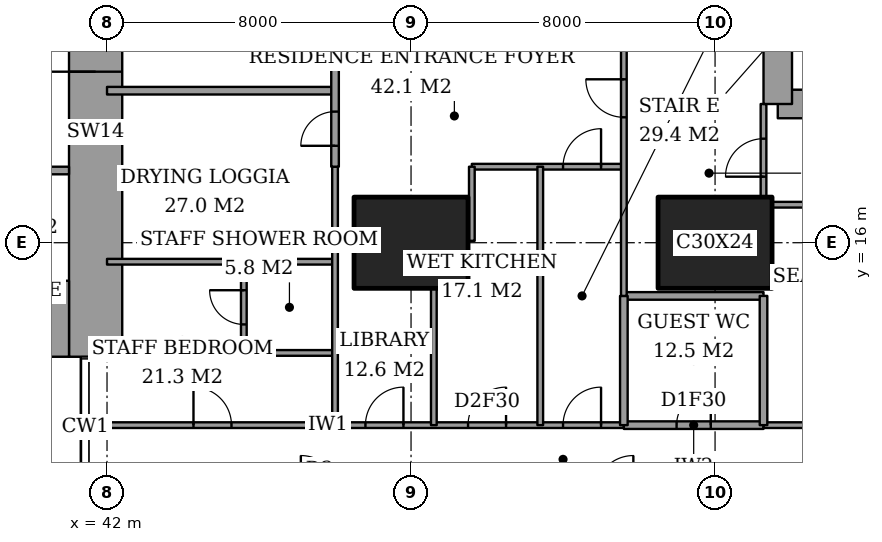
"""IFC4 building model, lengths in metres.
Left out: names, types, materials, properties, quantities, classifications, styles, units other than length and angle.
Written with IfcOpenShell. Run it as: python <this file> out.ifc"""

import sys

from ifc_helpers import new_model, si_unit, direction, frame, frame_2d, origin, origin_2d, place, context, subcontext, project, spatial, rectangle, extrude, element, fill, save


model = new_model("IFC4")
c1 = context("Model", 3, precision=1e-05, world=origin(), true_north=direction((0.0, 1.0)))
c2 = subcontext(c1, "Body", "Model", "MODEL_VIEW")
j1 = project(units=[si_unit("LENGTHUNIT", "METRE"), si_unit("PLANEANGLEUNIT", "RADIAN")], contexts=[c1])
p1 = place(None, origin())
s1 = spatial("IfcSite", under=j1, at=p1, CompositionType="ELEMENT")
p2 = place(p1, origin())
s2 = spatial("IfcBuilding", under=s1, at=p2, CompositionType="ELEMENT")
p3 = place(p2, frame((0.0, 0.0, 203.8)))
s3 = spatial("IfcBuildingStorey", under=s2, at=p3, CompositionType="ELEMENT", Elevation=203.8)
for number, where, z_axis, x_axis in (
    (1, (50.0, 16.0, 0.0), (0.0, 0.0, 1.0), (1.0, 0.0, 0.0)),
    (2, (58.0, 16.0, 0.0), (0.0, 0.0, 1.0), (1.0, 0.0, 0.0)),
):
    element("IfcColumn", number, at=place(p3, frame(where, z_axis=z_axis, x_axis=x_axis)), inside=s3, PredefinedType="COLUMN", context=c2, shape_type="SweptSolid", body=[
        extrude(rectangle(XDim=3.0, YDim=2.4, at=origin_2d()), origin(), (0.0, 0.0, 1.0), 3.6),
    ])
p4 = place(p3, frame((37.85, 14.0, 0.0), z_axis=(0.0, 0.0, 1.0), x_axis=(1.0, 0.0, 0.0)))
e3 = element("IfcWall", 3, at=p4, inside=s3, PredefinedType="SHEAR", context=c2, shape_type="SweptSolid", body=[
    extrude(rectangle(XDim=3.15, YDim=2.0, at=frame_2d((1.575, 0.0))), origin(), (0.0, 0.0, 1.0), 3.6),
])
p5 = place(p3, frame((41.7, 13.0, 0.0), z_axis=(0.0, 0.0, 1.0), x_axis=(0.0, 1.0, 0.0)))
e4 = element("IfcWall", 4, at=p5, inside=s3, PredefinedType="SHEAR", context=c2, shape_type="SweptSolid", body=[
    extrude(rectangle(XDim=11.85, YDim=1.4, at=frame_2d((5.925, 0.0))), origin(), (0.0, 0.0, 1.0), 3.6),
])
p6 = place(p5, frame((7.5, 0.0, 0.0)))
e5 = element("IfcOpeningElement", 5, at=p6, cuts=e4, PredefinedType="OPENING", context=c2, shape_type="SweptSolid", body=[
    extrude(rectangle(XDim=1.8, YDim=2.4, at=frame_2d((0.9, 1.2))), frame((0.0, 0.71, 0.0), z_axis=(0.0, -1.0, 0.0), x_axis=(1.0, 0.0, 0.0)), (0.0, 0.0, 1.0), 1.42),
])
p7 = place(p3, frame((59.65, 19.65, 0.0), z_axis=(0.0, 0.0, 1.0), x_axis=(1.0, 0.0, 0.0)))
e6 = element("IfcWall", 6, at=p7, inside=s3, PredefinedType="SHEAR", context=c2, shape_type="SweptSolid", body=[
    extrude(rectangle(XDim=4.45, YDim=0.75, at=frame_2d((2.225, 0.0))), origin(), (0.0, 0.0, 1.0), 3.6),
])
p8 = place(p3, frame((59.65, 28.35, 0.0), z_axis=(0.0, 0.0, 1.0), x_axis=(0.0, -1.0, 0.0)))
e7 = element("IfcWall", 7, at=p8, inside=s3, PredefinedType="SHEAR", context=c2, shape_type="SweptSolid", body=[
    extrude(rectangle(XDim=8.7, YDim=0.75, at=frame_2d((4.35, 0.0))), origin(), (0.0, 0.0, 1.0), 3.6),
])
p9 = place(p8, frame((0.975, 0.0, 0.0)))
e8 = element("IfcOpeningElement", 8, at=p9, cuts=e7, PredefinedType="OPENING", context=c2, shape_type="SweptSolid", body=[
    extrude(rectangle(XDim=1.0, YDim=2.1, at=frame_2d((0.5, 1.05))), frame((0.0, 0.385, 0.0), z_axis=(0.0, -1.0, 0.0), x_axis=(1.0, 0.0, 0.0)), (0.0, 0.0, 1.0), 0.77),
])
p10 = place(p3, frame((55.6, 11.2, 0.0), z_axis=(0.0, 0.0, 1.0), x_axis=(1.0, 0.0, 0.0)))
e9 = element("IfcWall", 9, at=p10, inside=s3, PredefinedType="PARTITIONING", context=c2, shape_type="SweptSolid", body=[
    extrude(rectangle(XDim=3.675, YDim=0.2, at=frame_2d((1.837, 0.0))), origin(), (0.0, 0.0, 1.0), 3.35),
])
p11 = place(p10, frame((1.387, 0.0, 0.0)))
e10 = element("IfcOpeningElement", 10, at=p11, cuts=e9, PredefinedType="OPENING", context=c2, shape_type="SweptSolid", body=[
    extrude(rectangle(XDim=0.9, YDim=2.1, at=frame_2d((0.45, 1.05))), frame((0.0, 0.11, 0.0), z_axis=(0.0, -1.0, 0.0), x_axis=(1.0, 0.0, 0.0)), (0.0, 0.0, 1.0), 0.22),
])
p12 = place(p3, frame((41.439, 11.2, 0.0), z_axis=(0.0, 0.0, 1.0), x_axis=(1.0, 0.0, 0.0)))
e11 = element("IfcWall", 11, at=p12, inside=s3, PredefinedType="PARTITIONING", context=c2, shape_type="SweptSolid", body=[
    extrude(rectangle(XDim=14.161, YDim=0.15, at=frame_2d((7.081, 0.0))), origin(), (0.0, 0.0, 1.0), 3.35),
])
p13 = place(p12, frame((12.561, 0.0, 0.0)))
e12 = element("IfcOpeningElement", 12, at=p13, cuts=e11, PredefinedType="OPENING", context=c2, shape_type="SweptSolid", body=[
    extrude(rectangle(XDim=1.0, YDim=2.1, at=frame_2d((0.5, 1.05))), frame((0.0, 0.085, 0.0), z_axis=(0.0, -1.0, 0.0), x_axis=(1.0, 0.0, 0.0)), (0.0, 0.0, 1.0), 0.17),
])
p14 = place(p12, frame((10.061, 0.0, 0.0)))
e13 = element("IfcOpeningElement", 13, at=p14, cuts=e11, PredefinedType="OPENING", context=c2, shape_type="SweptSolid", body=[
    extrude(rectangle(XDim=1.0, YDim=2.1, at=frame_2d((0.5, 1.05))), frame((0.0, 0.085, 0.0), z_axis=(0.0, -1.0, 0.0), x_axis=(1.0, 0.0, 0.0)), (0.0, 0.0, 1.0), 0.17),
])
p15 = place(p12, frame((7.361, 0.0, 0.0)))
e14 = element("IfcOpeningElement", 14, at=p15, cuts=e11, PredefinedType="OPENING", context=c2, shape_type="SweptSolid", body=[
    extrude(rectangle(XDim=1.0, YDim=2.1, at=frame_2d((0.5, 1.05))), frame((0.0, 0.085, 0.0), z_axis=(0.0, -1.0, 0.0), x_axis=(1.0, 0.0, 0.0)), (0.0, 0.0, 1.0), 0.17),
])
p16 = place(p12, frame((2.836, 0.0, 0.0)))
e15 = element("IfcOpeningElement", 15, at=p16, cuts=e11, PredefinedType="OPENING", context=c2, shape_type="SweptSolid", body=[
    extrude(rectangle(XDim=1.0, YDim=2.1, at=frame_2d((0.5, 1.05))), frame((0.0, 0.085, 0.0), z_axis=(0.0, -1.0, 0.0), x_axis=(1.0, 0.0, 0.0)), (0.0, 0.0, 1.0), 0.17),
])
p17 = place(p3, frame((59.275, 11.2, 0.0), z_axis=(0.0, 0.0, 1.0), x_axis=(1.0, 0.0, 0.0)))
e16 = element("IfcWall", 16, at=p17, inside=s3, PredefinedType="PARTITIONING", context=c2, shape_type="SweptSolid", body=[
    extrude(rectangle(XDim=7.175, YDim=0.15, at=frame_2d((3.587, 0.0))), origin(), (0.0, 0.0, 1.0), 3.35),
])
p18 = place(p17, frame((3.087, 0.0, 0.0)))
e17 = element("IfcOpeningElement", 17, at=p18, cuts=e16, PredefinedType="OPENING", context=c2, shape_type="SweptSolid", body=[
    extrude(rectangle(XDim=1.0, YDim=2.1, at=frame_2d((0.5, 1.05))), frame((0.0, 0.085, 0.0), z_axis=(0.0, -1.0, 0.0), x_axis=(1.0, 0.0, 0.0)), (0.0, 0.0, 1.0), 0.17),
])
p19 = place(p3, frame((45.6, 13.1, 0.0), z_axis=(0.0, 0.0, 1.0), x_axis=(1.0, 0.0, 0.0)))
e18 = element("IfcWall", 18, at=p19, inside=s3, PredefinedType="PARTITIONING", context=c2, shape_type="SweptSolid", body=[
    extrude(rectangle(XDim=2.4, YDim=0.15, at=frame_2d((1.2, 0.0))), origin(), (0.0, 0.0, 1.0), 3.35),
])
p20 = place(p3, frame((55.6, 14.6, 0.0), z_axis=(0.0, 0.0, 1.0), x_axis=(1.0, 0.0, 0.0)))
e19 = element("IfcWall", 19, at=p20, inside=s3, PredefinedType="PARTITIONING", context=c2, shape_type="SweptSolid", body=[
    extrude(rectangle(XDim=3.675, YDim=0.2, at=frame_2d((1.837, 0.0))), origin(), (0.0, 0.0, 1.0), 3.35),
])
p21 = place(p3, frame((42.0, 15.5, 0.0), z_axis=(0.0, 0.0, 1.0), x_axis=(1.0, 0.0, 0.0)))
e20 = element("IfcWall", 20, at=p21, inside=s3, PredefinedType="PARTITIONING", context=c2, shape_type="SweptSolid", body=[
    extrude(rectangle(XDim=6.0, YDim=0.15, at=frame_2d((3.0, 0.0))), origin(), (0.0, 0.0, 1.0), 3.35),
])
p22 = place(p3, frame((48.0, 16.05, 0.0), z_axis=(0.0, 0.0, 1.0), x_axis=(1.0, 0.0, 0.0)))
e21 = element("IfcWall", 21, at=p22, inside=s3, PredefinedType="PARTITIONING", context=c2, shape_type="SweptSolid", body=[
    extrude(rectangle(XDim=0.5, YDim=0.15, at=frame_2d((0.25, 0.0))), origin(), (0.0, 0.0, 1.0), 2.634),
])
p23 = place(p3, frame((59.5, 17.0, 0.0), z_axis=(0.0, 0.0, 1.0), x_axis=(1.0, 0.0, 0.0)))
e22 = element("IfcWall", 22, at=p23, inside=s3, PredefinedType="PARTITIONING", context=c2, shape_type="SweptSolid", body=[
    extrude(rectangle(XDim=6.95, YDim=0.15, at=frame_2d((3.475, 0.0))), origin(), (0.0, 0.0, 1.0), 3.35),
])
p24 = place(p3, frame((51.6, 18.0, 0.0), z_axis=(0.0, 0.0, 1.0), x_axis=(1.0, 0.0, 0.0)))
e23 = element("IfcWall", 23, at=p24, inside=s3, PredefinedType="PARTITIONING", context=c2, shape_type="SweptSolid", body=[
    extrude(rectangle(XDim=4.0, YDim=0.15, at=frame_2d((2.0, 0.0))), origin(), (0.0, 0.0, 1.0), 3.35),
])
p25 = place(p24, frame((2.4, 0.0, 0.0)))
e24 = element("IfcOpeningElement", 24, at=p25, cuts=e23, PredefinedType="OPENING", context=c2, shape_type="SweptSolid", body=[
    extrude(rectangle(XDim=1.0, YDim=2.1, at=frame_2d((0.5, 1.05))), frame((0.0, 0.085, 0.0), z_axis=(0.0, -1.0, 0.0), x_axis=(1.0, 0.0, 0.0)), (0.0, 0.0, 1.0), 0.17),
])
p26 = place(p3, frame((42.0, 20.0, 0.0), z_axis=(0.0, 0.0, 1.0), x_axis=(1.0, 0.0, 0.0)))
e25 = element("IfcWall", 25, at=p26, inside=s3, PredefinedType="PARTITIONING", context=c2, shape_type="SweptSolid", body=[
    extrude(rectangle(XDim=6.0, YDim=0.2, at=frame_2d((3.0, 0.0))), origin(), (0.0, 0.0, 1.0), 3.35),
])
p27 = place(p3, frame((45.6, 13.1, 0.0), z_axis=(0.0, 0.0, 1.0), x_axis=(0.0, 1.0, 0.0)))
e26 = element("IfcWall", 26, at=p27, inside=s3, PredefinedType="PARTITIONING", context=c2, shape_type="SweptSolid", body=[
    extrude(rectangle(XDim=2.4, YDim=0.15, at=frame_2d((1.2, 0.0))), origin(), (0.0, 0.0, 1.0), 3.35),
])
p28 = place(p27, frame((0.75, 0.0, 0.0)))
e27 = element("IfcOpeningElement", 27, at=p28, cuts=e26, PredefinedType="OPENING", context=c2, shape_type="SweptSolid", body=[
    extrude(rectangle(XDim=0.9, YDim=2.1, at=frame_2d((0.45, 1.05))), frame((0.0, 0.085, 0.0), z_axis=(0.0, -1.0, 0.0), x_axis=(1.0, 0.0, 0.0)), (0.0, 0.0, 1.0), 0.17),
])
p29 = place(p3, frame((48.0, 18.0, 0.0), z_axis=(0.0, 0.0, 1.0), x_axis=(0.0, 1.0, 0.0)))
e28 = element("IfcWall", 28, at=p29, inside=s3, PredefinedType="PARTITIONING", context=c2, shape_type="SweptSolid", body=[
    extrude(rectangle(XDim=6.0, YDim=0.2, at=frame_2d((3.0, 0.0))), origin(), (0.0, 0.0, 1.0), 3.35),
])
p30 = place(p29, frame((3.4, 0.0, 0.0)))
e29 = element("IfcOpeningElement", 29, at=p30, cuts=e28, PredefinedType="OPENING", context=c2, shape_type="SweptSolid", body=[
    extrude(rectangle(XDim=1.2, YDim=2.4, at=frame_2d((0.6, 1.2))), frame((0.0, 0.11, 0.0), z_axis=(0.0, -1.0, 0.0), x_axis=(1.0, 0.0, 0.0)), (0.0, 0.0, 1.0), 0.22),
])
p31 = place(p29, frame((0.55, 0.0, 0.0)))
e30 = element("IfcOpeningElement", 30, at=p31, cuts=e28, PredefinedType="OPENING", context=c2, shape_type="SweptSolid", body=[
    extrude(rectangle(XDim=0.9, YDim=2.1, at=frame_2d((0.45, 1.05))), frame((0.0, 0.11, 0.0), z_axis=(0.0, -1.0, 0.0), x_axis=(1.0, 0.0, 0.0)), (0.0, 0.0, 1.0), 0.22),
])
p32 = place(p3, frame((48.0, 11.2, 0.0), z_axis=(0.0, 0.0, 1.0), x_axis=(0.0, 1.0, 0.0)))
e31 = element("IfcWall", 31, at=p32, inside=s3, PredefinedType="PARTITIONING", context=c2, shape_type="SweptSolid", body=[
    extrude(rectangle(XDim=6.8, YDim=0.15, at=frame_2d((3.4, 0.0))), origin(), (0.0, 0.0, 1.0), 3.35),
])
p33 = place(p3, frame((50.6, 11.2, 0.0), z_axis=(0.0, 0.0, 1.0), x_axis=(0.0, 1.0, 0.0)))
e32 = element("IfcWall", 32, at=p33, inside=s3, PredefinedType="PARTITIONING", context=c2, shape_type="SweptSolid", body=[
    extrude(rectangle(XDim=3.6, YDim=0.15, at=frame_2d((1.8, 0.0))), origin(), (0.0, 0.0, 1.0), 3.35),
])
p34 = place(p3, frame((51.6, 16.05, 0.0), z_axis=(0.0, 0.0, 1.0), x_axis=(0.0, 1.0, 0.0)))
e33 = element("IfcWall", 33, at=p34, inside=s3, PredefinedType="PARTITIONING", context=c2, shape_type="SweptSolid", body=[
    extrude(rectangle(XDim=1.95, YDim=0.15, at=frame_2d((0.975, 0.0))), origin(), (0.0, 0.0, 1.0), 3.35),
])
p35 = place(p3, frame((53.4, 11.2, 0.0), z_axis=(0.0, 0.0, 1.0), x_axis=(0.0, 1.0, 0.0)))
e34 = element("IfcWall", 34, at=p35, inside=s3, PredefinedType="PARTITIONING", context=c2, shape_type="SweptSolid", body=[
    extrude(rectangle(XDim=6.8, YDim=0.15, at=frame_2d((3.4, 0.0))), origin(), (0.0, 0.0, 1.0), 3.35),
])
p36 = place(p3, frame((55.6, 11.2, 0.0), z_axis=(0.0, 0.0, 1.0), x_axis=(0.0, 1.0, 0.0)))
e35 = element("IfcWall", 35, at=p36, inside=s3, PredefinedType="PARTITIONING", context=c2, shape_type="SweptSolid", body=[
    extrude(rectangle(XDim=3.4, YDim=0.2, at=frame_2d((1.7, 0.0))), origin(), (0.0, 0.0, 1.0), 3.35),
])
p37 = place(p3, frame((55.6, 14.6, 0.0), z_axis=(0.0, 0.0, 1.0), x_axis=(0.0, 1.0, 0.0)))
e36 = element("IfcWall", 36, at=p37, inside=s3, PredefinedType="PARTITIONING", context=c2, shape_type="SweptSolid", body=[
    extrude(rectangle(XDim=7.0, YDim=0.15, at=frame_2d((3.5, 0.0))), origin(), (0.0, 0.0, 1.0), 3.35),
])
p38 = place(p37, frame((4.7, 0.0, 0.0)))
e37 = element("IfcOpeningElement", 37, at=p38, cuts=e36, PredefinedType="OPENING", context=c2, shape_type="SweptSolid", body=[
    extrude(rectangle(XDim=1.0, YDim=2.1, at=frame_2d((0.5, 1.05))), frame((0.0, 0.085, 0.0), z_axis=(0.0, -1.0, 0.0), x_axis=(1.0, 0.0, 0.0)), (0.0, 0.0, 1.0), 0.17),
])
p39 = place(p3, frame((59.275, 11.2, 0.0), z_axis=(0.0, 0.0, 1.0), x_axis=(0.0, 1.0, 0.0)))
e38 = element("IfcWall", 38, at=p39, inside=s3, PredefinedType="PARTITIONING", context=c2, shape_type="SweptSolid", body=[
    extrude(rectangle(XDim=3.4, YDim=0.2, at=frame_2d((1.7, 0.0))), origin(), (0.0, 0.0, 1.0), 3.35),
])
p40 = place(p3, frame((59.275, 17.2, 0.0), z_axis=(0.0, 0.0, 1.0), x_axis=(0.0, 1.0, 0.0)))
e39 = element("IfcWall", 39, at=p40, inside=s3, PredefinedType="PARTITIONING", context=c2, shape_type="SweptSolid", body=[
    extrude(rectangle(XDim=2.45, YDim=0.15, at=frame_2d((1.225, 0.0))), origin(), (0.0, 0.0, 1.0), 3.35),
])
p41 = place(p40, frame((0.538, 0.0, 0.0)))
e40 = element("IfcOpeningElement", 40, at=p41, cuts=e39, PredefinedType="OPENING", context=c2, shape_type="SweptSolid", body=[
    extrude(rectangle(XDim=1.0, YDim=2.1, at=frame_2d((0.5, 1.05))), frame((0.0, 0.085, 0.0), z_axis=(0.0, -1.0, 0.0), x_axis=(1.0, 0.0, 0.0)), (0.0, 0.0, 1.0), 0.17),
])
p42 = place(p3, frame((28.3, 17.9, 0.0), z_axis=(0.0, 0.0, 1.0), x_axis=(1.0, 0.0, 0.0)))
e41 = element("IfcWall", 41, at=p42, inside=s3, PredefinedType="PARTITIONING", context=c2, shape_type="SweptSolid", body=[
    extrude(rectangle(XDim=12.7, YDim=0.2, at=frame_2d((6.35, 0.0))), origin(), (0.0, 0.0, 1.0), 3.6),
])
p43 = place(p42, frame((1.0, 0.0, 0.0)))
e42 = element("IfcOpeningElement", 42, at=p43, cuts=e41, PredefinedType="OPENING", context=c2, shape_type="SweptSolid", body=[
    extrude(rectangle(XDim=1.0, YDim=2.1, at=frame_2d((0.5, 1.05))), frame((0.0, 0.11, 0.0), z_axis=(0.0, -1.0, 0.0), x_axis=(1.0, 0.0, 0.0)), (0.0, 0.0, 1.0), 0.22),
])
p44 = place(p42, frame((7.45, 0.0, 0.0)))
e43 = element("IfcOpeningElement", 43, at=p44, cuts=e41, PredefinedType="OPENING", context=c2, shape_type="SweptSolid", body=[
    extrude(rectangle(XDim=0.9, YDim=2.1, at=frame_2d((0.45, 1.05))), frame((0.0, 0.11, 0.0), z_axis=(0.0, -1.0, 0.0), x_axis=(1.0, 0.0, 0.0)), (0.0, 0.0, 1.0), 0.22),
])
p45 = place(p42, frame((10.6, 0.0, 0.0)))
e44 = element("IfcOpeningElement", 44, at=p45, cuts=e41, PredefinedType="OPENING", context=c2, shape_type="SweptSolid", body=[
    extrude(rectangle(XDim=1.2, YDim=2.1, at=frame_2d((0.6, 1.05))), frame((0.0, 0.11, 0.0), z_axis=(0.0, -1.0, 0.0), x_axis=(1.0, 0.0, 0.0)), (0.0, 0.0, 1.0), 0.22),
])
p46 = place(p13, origin())
e45 = element("IfcDoor", 45, at=p46, inside=s3, OperationType="SINGLE_SWING_LEFT", PredefinedType="DOOR", context=c2, shape_type="SweptSolid", body=[
    extrude(rectangle(XDim=1.0, YDim=2.1, at=frame_2d((0.5, 1.05))), frame((0.0, 0.025, 0.0), z_axis=(0.0, -1.0, 0.0), x_axis=(1.0, 0.0, 0.0)), (0.0, 0.0, 1.0), 0.05),
])
fill(e12, e45)
p47 = place(p41, origin())
e46 = element("IfcDoor", 46, at=p47, inside=s3, OperationType="SINGLE_SWING_RIGHT", PredefinedType="DOOR", context=c2, shape_type="SweptSolid", body=[
    extrude(rectangle(XDim=1.0, YDim=2.1, at=frame_2d((0.5, 1.05))), frame((0.0, 0.025, 0.0), z_axis=(0.0, -1.0, 0.0), x_axis=(1.0, 0.0, 0.0)), (0.0, 0.0, 1.0), 0.05),
])
fill(e40, e46)
p48 = place(p11, origin())
e47 = element("IfcDoor", 47, at=p48, inside=s3, OperationType="SINGLE_SWING_LEFT", PredefinedType="DOOR", context=c2, shape_type="SweptSolid", body=[
    extrude(rectangle(XDim=0.9, YDim=2.1, at=frame_2d((0.45, 1.05))), frame((0.0, 0.025, 0.0), z_axis=(0.0, -1.0, 0.0), x_axis=(1.0, 0.0, 0.0)), (0.0, 0.0, 1.0), 0.05),
])
fill(e10, e47)
p49 = place(p38, origin())
e48 = element("IfcDoor", 48, at=p49, inside=s3, OperationType="SINGLE_SWING_LEFT", PredefinedType="DOOR", context=c2, shape_type="SweptSolid", body=[
    extrude(rectangle(XDim=1.0, YDim=2.1, at=frame_2d((0.5, 1.05))), frame((0.0, 0.025, 0.0), z_axis=(0.0, -1.0, 0.0), x_axis=(1.0, 0.0, 0.0)), (0.0, 0.0, 1.0), 0.05),
])
fill(e37, e48)
p50 = place(p25, origin())
e49 = element("IfcDoor", 49, at=p50, inside=s3, OperationType="SINGLE_SWING_LEFT", PredefinedType="DOOR", context=c2, shape_type="SweptSolid", body=[
    extrude(rectangle(XDim=1.0, YDim=2.1, at=frame_2d((0.5, 1.05))), frame((0.0, 0.025, 0.0), z_axis=(0.0, -1.0, 0.0), x_axis=(1.0, 0.0, 0.0)), (0.0, 0.0, 1.0), 0.05),
])
fill(e24, e49)
p51 = place(p14, origin())
e50 = element("IfcDoor", 50, at=p51, inside=s3, OperationType="SINGLE_SWING_LEFT", PredefinedType="DOOR", context=c2, shape_type="SweptSolid", body=[
    extrude(rectangle(XDim=1.0, YDim=2.1, at=frame_2d((0.5, 1.05))), frame((0.0, 0.025, 0.0), z_axis=(0.0, -1.0, 0.0), x_axis=(1.0, 0.0, 0.0)), (0.0, 0.0, 1.0), 0.05),
])
fill(e13, e50)
p52 = place(p15, origin())
e51 = element("IfcDoor", 51, at=p52, inside=s3, OperationType="SINGLE_SWING_LEFT", PredefinedType="DOOR", context=c2, shape_type="SweptSolid", body=[
    extrude(rectangle(XDim=1.0, YDim=2.1, at=frame_2d((0.5, 1.05))), frame((0.0, 0.025, 0.0), z_axis=(0.0, -1.0, 0.0), x_axis=(1.0, 0.0, 0.0)), (0.0, 0.0, 1.0), 0.05),
])
fill(e14, e51)
p53 = place(p28, origin())
e52 = element("IfcDoor", 52, at=p53, inside=s3, OperationType="SINGLE_SWING_LEFT", PredefinedType="DOOR", context=c2, shape_type="SweptSolid", body=[
    extrude(rectangle(XDim=0.9, YDim=2.1, at=frame_2d((0.45, 1.05))), frame((0.0, 0.025, 0.0), z_axis=(0.0, -1.0, 0.0), x_axis=(1.0, 0.0, 0.0)), (0.0, 0.0, 1.0), 0.05),
])
fill(e27, e52)
p54 = place(p16, origin())
e53 = element("IfcDoor", 53, at=p54, inside=s3, OperationType="SINGLE_SWING_RIGHT", PredefinedType="DOOR", context=c2, shape_type="SweptSolid", body=[
    extrude(rectangle(XDim=1.0, YDim=2.1, at=frame_2d((0.5, 1.05))), frame((0.0, 0.025, 0.0), z_axis=(0.0, -1.0, 0.0), x_axis=(1.0, 0.0, 0.0)), (0.0, 0.0, 1.0), 0.05),
])
fill(e15, e53)
p55 = place(p31, origin())
e54 = element("IfcDoor", 54, at=p55, inside=s3, OperationType="SINGLE_SWING_RIGHT", PredefinedType="DOOR", context=c2, shape_type="SweptSolid", body=[
    extrude(rectangle(XDim=0.9, YDim=2.1, at=frame_2d((0.45, 1.05))), frame((0.0, 0.025, 0.0), z_axis=(0.0, -1.0, 0.0), x_axis=(1.0, 0.0, 0.0)), (0.0, 0.0, 1.0), 0.05),
])
fill(e30, e54)
p56 = place(p6, origin())
e55 = element("IfcDoor", 55, at=p56, inside=s3, OperationType="DOUBLE_DOOR_DOUBLE_SWING", PredefinedType="DOOR", context=c2, shape_type="SweptSolid", body=[
    extrude(rectangle(XDim=1.8, YDim=2.4, at=frame_2d((0.9, 1.2))), frame((0.0, 0.025, 0.0), z_axis=(0.0, -1.0, 0.0), x_axis=(1.0, 0.0, 0.0)), (0.0, 0.0, 1.0), 0.05),
])
fill(e5, e55)
save(model, sys.argv[1])
